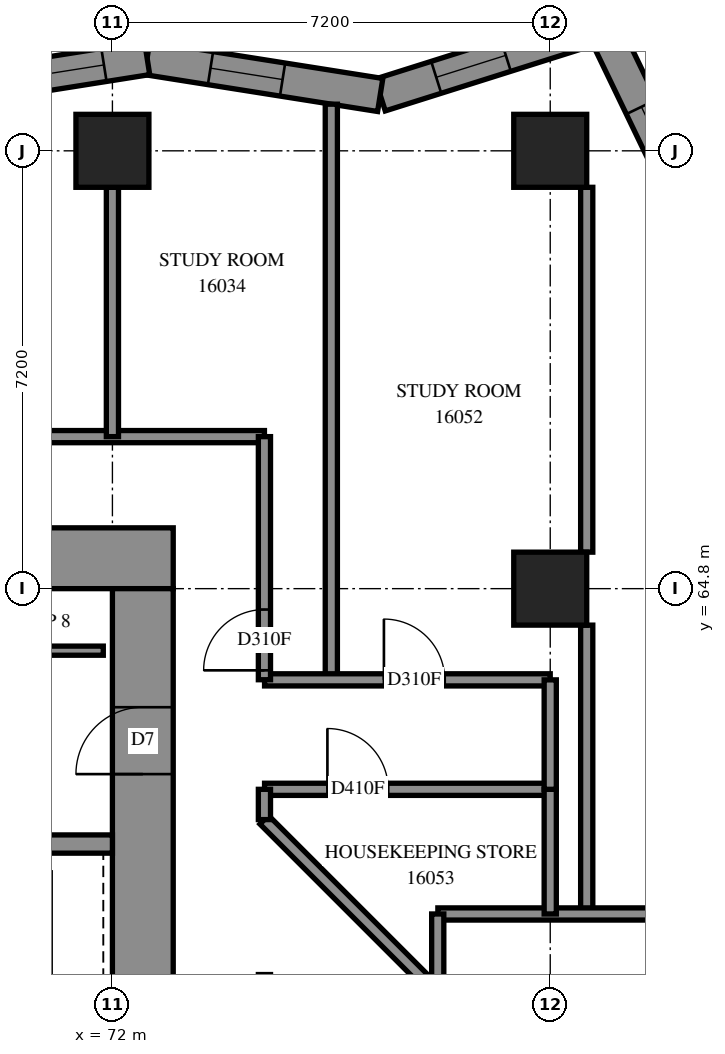
"""IFC4 building model, lengths in metres.
Left out: names, types, materials, properties, quantities, classifications, styles, units other than length and angle.
Written with IfcOpenShell. Run it as: python <this file> out.ifc"""

import sys

from ifc_helpers import new_model, si_unit, direction, frame, frame_2d, origin, origin_2d, place, context, subcontext, project, spatial, polyline, rectangle, outline, extrude, element, fill, save


model = new_model("IFC4")
c1 = context("Model", 3, precision=1e-05, world=origin(), true_north=direction((0.0, 1.0)))
c2 = subcontext(c1, "Body", "Model", "MODEL_VIEW")
j1 = project(units=[si_unit("LENGTHUNIT", "METRE"), si_unit("PLANEANGLEUNIT", "RADIAN")], contexts=[c1])
p1 = place(None, origin())
s1 = spatial("IfcSite", under=j1, at=p1, CompositionType="ELEMENT")
p2 = place(p1, origin())
s2 = spatial("IfcBuilding", under=s1, at=p2, CompositionType="ELEMENT")
p3 = place(p2, frame((0.0, 0.0, 61.0)))
s3 = spatial("IfcBuildingStorey", under=s2, at=p3, CompositionType="ELEMENT", Elevation=61.0)
for number, where, z_axis, x_axis in (
    (1, (72.0, 72.0, 0.0), (0.0, 0.0, 1.0), (1.0, 0.0, 0.0)),
    (2, (79.2, 64.8, 0.0), (0.0, 0.0, 1.0), (1.0, 0.0, 0.0)),
    (3, (79.2, 72.0, 0.0), (0.0, 0.0, 1.0), (1.0, 0.0, 0.0)),
):
    element("IfcColumn", number, at=place(p3, frame(where, z_axis=z_axis, x_axis=x_axis)), inside=s3, PredefinedType="COLUMN", context=c2, shape_type="SweptSolid", body=[
        extrude(rectangle(XDim=1.2, YDim=1.2, at=origin_2d()), origin(), (0.0, 0.0, 1.0), 3.1),
    ])
p4 = place(p3, frame((56.6, 65.3, -0.3), z_axis=(0.0, 0.0, 1.0), x_axis=(1.0, 0.0, 0.0)))
e4 = element("IfcWall", 4, at=p4, inside=s3, PredefinedType="SHEAR", context=c2, shape_type="SweptSolid", body=[
    extrude(rectangle(XDim=16.4, YDim=1.0, at=frame_2d((8.2, 0.0))), origin(), (0.0, 0.0, 1.0), 2.7),
])
p5 = place(p4, frame((11.0, 0.0, 0.3)))
e5 = element("IfcOpeningElement", 5, at=p5, cuts=e4, PredefinedType="OPENING", context=c2, shape_type="SweptSolid", body=[
    extrude(rectangle(XDim=0.8, YDim=2.1, at=frame_2d((0.4, 1.05))), frame((0.0, 0.51, 0.0), z_axis=(0.0, -1.0, 0.0), x_axis=(1.0, 0.0, 0.0)), (0.0, 0.0, 1.0), 1.02),
])
p6 = place(p3, frame((72.5, 50.4, -0.3), z_axis=(0.0, 0.0, 1.0), x_axis=(0.0, 1.0, 0.0)))
e6 = element("IfcWall", 6, at=p6, inside=s3, PredefinedType="SHEAR", context=c2, shape_type="SweptSolid", body=[
    extrude(rectangle(XDim=14.4, YDim=1.0, at=frame_2d((7.2, 0.0))), origin(), (0.0, 0.0, 1.0), 2.7),
])
p7 = place(p6, frame((4.55, 0.0, 0.3)))
e7 = element("IfcOpeningElement", 7, at=p7, cuts=e6, PredefinedType="OPENING", context=c2, shape_type="SweptSolid", body=[
    extrude(rectangle(XDim=1.1, YDim=2.1, at=frame_2d((0.55, 1.05))), frame((0.0, 0.51, 0.0), z_axis=(0.0, -1.0, 0.0), x_axis=(1.0, 0.0, 0.0)), (0.0, 0.0, 1.0), 1.02),
])
p8 = place(p6, frame((11.35, 0.0, 0.3)))
e8 = element("IfcOpeningElement", 8, at=p8, cuts=e6, PredefinedType="OPENING", context=c2, shape_type="SweptSolid", body=[
    extrude(rectangle(XDim=1.1, YDim=2.1, at=frame_2d((0.55, 1.05))), frame((0.0, 0.51, 0.0), z_axis=(0.0, -1.0, 0.0), x_axis=(1.0, 0.0, 0.0)), (0.0, 0.0, 1.0), 1.02),
])
p9 = place(p3, frame((64.8, 60.6, 0.0), z_axis=(0.0, 0.0, 1.0), x_axis=(1.0, 0.0, 0.0)))
e9 = element("IfcWall", 9, at=p9, inside=s3, PredefinedType="SOLIDWALL", context=c2, shape_type="SweptSolid", body=[
    extrude(rectangle(XDim=7.2, YDim=0.3, at=frame_2d((3.6, 0.0))), origin(), (0.0, 0.0, 1.0), 3.1),
])
p10 = place(p3, frame((76.301, 49.443, -0.3), z_axis=(0.0, 0.0, 1.0), x_axis=(0.7071067812, 0.7071067812, 0.0)))
e10 = element("IfcWall", 10, at=p10, inside=s3, PredefinedType="SHEAR", context=c2, shape_type="SweptSolid", body=[
    extrude(rectangle(XDim=14.4, YDim=1.0, at=frame_2d((7.2, 0.0))), origin(), (0.0, 0.0, 1.0), 2.7),
])
p11 = place(p10, frame((4.55, 0.0, 0.3)))
e11 = element("IfcOpeningElement", 11, at=p11, cuts=e10, PredefinedType="OPENING", context=c2, shape_type="SweptSolid", body=[
    extrude(rectangle(XDim=1.1, YDim=2.1, at=frame_2d((0.55, 1.05))), frame((0.0, 0.51, 0.0), z_axis=(0.0, -1.0, 0.0), x_axis=(1.0, 0.0, 0.0)), (0.0, 0.0, 1.0), 1.02),
])
p12 = place(p10, frame((11.35, 0.0, 0.3)))
e12 = element("IfcOpeningElement", 12, at=p12, cuts=e10, PredefinedType="OPENING", context=c2, shape_type="SweptSolid", body=[
    extrude(rectangle(XDim=1.1, YDim=2.1, at=frame_2d((0.55, 1.05))), frame((0.0, 0.51, 0.0), z_axis=(0.0, -1.0, 0.0), x_axis=(1.0, 0.0, 0.0)), (0.0, 0.0, 1.0), 1.02),
])
p13 = place(p3, frame((81.559, 70.938, 0.0), z_axis=(0.0, 0.0, 1.0), x_axis=(-0.4338121581, 0.901003336, 0.0)))
e13 = element("IfcWall", 13, at=p13, inside=s3, PredefinedType="SOLIDWALL", context=c2, shape_type="SweptSolid", body=[
    extrude(outline(polyline([(0.072, -0.275), (3.713, -0.275), (3.237, 0.275), (-0.072, 0.275), (0.072, -0.275)])), origin(), (0.0, 0.0, 1.0), 3.1),
])
p14 = place(p13, frame((0.781, 0.0, 0.5)))
e14 = element("IfcOpeningElement", 14, at=p14, cuts=e13, PredefinedType="OPENING", context=c2, shape_type="SweptSolid", body=[
    extrude(rectangle(XDim=1.2, YDim=2.45, at=frame_2d((0.6, 1.225))), frame((0.0, 0.285, 0.0), z_axis=(0.0, -1.0, 0.0), x_axis=(1.0, 0.0, 0.0)), (0.0, 0.0, 1.0), 0.57),
])
p15 = place(p3, frame((80.051, 74.069, 0.0), z_axis=(0.0, 0.0, 1.0), x_axis=(-0.953649035, -0.3009211159, 0.0)))
e15 = element("IfcWall", 15, at=p15, inside=s3, PredefinedType="SOLIDWALL", context=c2, shape_type="SweptSolid", body=[
    extrude(outline(polyline([(-0.238, -0.275), (3.76, -0.275), (3.889, 0.275), (0.238, 0.275), (-0.238, -0.275)])), origin(), (0.0, 0.0, 1.0), 3.1),
])
p16 = place(p15, frame((1.658, 0.0, 0.5)))
e16 = element("IfcOpeningElement", 16, at=p16, cuts=e15, PredefinedType="OPENING", context=c2, shape_type="SweptSolid", body=[
    extrude(rectangle(XDim=1.2, YDim=2.45, at=frame_2d((0.6, 1.225))), frame((0.0, 0.285, 0.0), z_axis=(0.0, -1.0, 0.0), x_axis=(1.0, 0.0, 0.0)), (0.0, 0.0, 1.0), 0.57),
])
p17 = place(p3, frame((76.404, 72.918, 0.0), z_axis=(0.0, 0.0, 1.0), x_axis=(-0.9877221932, 0.1562205785, 0.0)))
e17 = element("IfcWall", 17, at=p17, inside=s3, PredefinedType="SOLIDWALL", context=c2, shape_type="SweptSolid", body=[
    extrude(outline(polyline([(0.065, -0.275), (3.925, -0.275), (3.838, 0.275), (-0.065, 0.275), (0.065, -0.275)])), origin(), (0.0, 0.0, 1.0), 3.1),
])
p18 = place(p17, frame((1.626, 0.0, 0.5)))
e18 = element("IfcOpeningElement", 18, at=p18, cuts=e17, PredefinedType="OPENING", context=c2, shape_type="SweptSolid", body=[
    extrude(rectangle(XDim=1.2, YDim=2.45, at=frame_2d((0.6, 1.225))), frame((0.0, 0.285, 0.0), z_axis=(0.0, -1.0, 0.0), x_axis=(1.0, 0.0, 0.0)), (0.0, 0.0, 1.0), 0.57),
])
p19 = place(p3, frame((72.571, 73.525, 0.0), z_axis=(0.0, 0.0, 1.0), x_axis=(-0.9877213372, -0.1562259905, 0.0)))
e19 = element("IfcWall", 19, at=p19, inside=s3, PredefinedType="SOLIDWALL", context=c2, shape_type="SweptSolid", body=[
    extrude(outline(polyline([(-0.043, -0.275), (3.816, -0.275), (3.903, 0.275), (0.043, 0.275), (-0.043, -0.275)])), origin(), (0.0, 0.0, 1.0), 3.1),
])
p20 = place(p19, frame((0.719, 0.0, 0.5)))
e20 = element("IfcOpeningElement", 20, at=p20, cuts=e19, PredefinedType="OPENING", context=c2, shape_type="SweptSolid", body=[
    extrude(rectangle(XDim=2.8, YDim=2.45, at=frame_2d((1.4, 1.225))), frame((0.0, 0.285, 0.0), z_axis=(0.0, -1.0, 0.0), x_axis=(1.0, 0.0, 0.0)), (0.0, 0.0, 1.0), 0.57),
])
p21 = place(p3, frame((64.95, 63.78, 0.0), z_axis=(0.0, 0.0, 1.0), x_axis=(1.0, 0.0, 0.0)))
e21 = element("IfcWall", 21, at=p21, inside=s3, PredefinedType="PARTITIONING", context=c2, shape_type="SweptSolid", body=[
    extrude(rectangle(XDim=6.9, YDim=0.15, at=frame_2d((3.45, 0.0))), origin(), (0.0, 0.0, 1.0), 3.1),
])
p22 = place(p3, frame((55.1, 67.3, 0.0), z_axis=(0.0, 0.0, 1.0), x_axis=(1.0, 0.0, 0.0)))
e22 = element("IfcWall", 22, at=p22, inside=s3, PredefinedType="PARTITIONING", context=c2, shape_type="SweptSolid", body=[
    extrude(rectangle(XDim=19.4, YDim=0.2, at=frame_2d((9.7, 0.0))), origin(), (0.0, 0.0, 1.0), 3.1),
])
p23 = place(p22, frame((6.361, 0.0, 0.0)))
e23 = element("IfcOpeningElement", 23, at=p23, cuts=e22, PredefinedType="OPENING", context=c2, shape_type="SweptSolid", body=[
    extrude(rectangle(XDim=0.9, YDim=2.1, at=frame_2d((0.45, 1.05))), frame((0.0, 0.11, 0.0), z_axis=(0.0, -1.0, 0.0), x_axis=(1.0, 0.0, 0.0)), (0.0, 0.0, 1.0), 0.22),
])
p24 = place(p22, frame((13.561, 0.0, 0.0)))
e24 = element("IfcOpeningElement", 24, at=p24, cuts=e22, PredefinedType="OPENING", context=c2, shape_type="SweptSolid", body=[
    extrude(rectangle(XDim=0.9, YDim=2.1, at=frame_2d((0.45, 1.05))), frame((0.0, 0.11, 0.0), z_axis=(0.0, -1.0, 0.0), x_axis=(1.0, 0.0, 0.0)), (0.0, 0.0, 1.0), 0.22),
])
p25 = place(p3, frame((75.6, 63.3, 0.0), z_axis=(0.0, 0.0, 1.0), x_axis=(0.0, 1.0, 0.0)))
e25 = element("IfcWall", 25, at=p25, inside=s3, PredefinedType="PARTITIONING", context=c2, shape_type="SweptSolid", body=[
    extrude(rectangle(XDim=9.467, YDim=0.2, at=frame_2d((4.734, 0.0))), origin(), (0.0, 0.0, 1.0), 3.1),
])
p26 = place(p3, frame((79.8, 65.4, 0.0), z_axis=(0.0, 0.0, 1.0), x_axis=(0.0, 1.0, 0.0)))
e26 = element("IfcWall", 26, at=p26, inside=s3, PredefinedType="PARTITIONING", context=c2, shape_type="SweptSolid", body=[
    extrude(rectangle(XDim=6.0, YDim=0.2, at=frame_2d((3.0, 0.0))), origin(), (0.0, 0.0, 1.0), 3.1),
])
p27 = place(p3, frame((79.8, 59.45, 0.0), z_axis=(0.0, 0.0, 1.0), x_axis=(0.0, 1.0, 0.0)))
e27 = element("IfcWall", 27, at=p27, inside=s3, PredefinedType="PARTITIONING", context=c2, shape_type="SweptSolid", body=[
    extrude(rectangle(XDim=4.75, YDim=0.2, at=frame_2d((2.375, 0.0))), origin(), (0.0, 0.0, 1.0), 3.1),
])
p28 = place(p3, frame((74.502, 63.3, 0.0), z_axis=(0.0, 0.0, 1.0), x_axis=(1.0, 0.0, 0.0)))
e28 = element("IfcWall", 28, at=p28, inside=s3, PredefinedType="PARTITIONING", context=c2, shape_type="SweptSolid", body=[
    extrude(rectangle(XDim=4.698, YDim=0.2, at=frame_2d((2.349, 0.0))), origin(), (0.0, 0.0, 1.0), 3.1),
])
p29 = place(p28, frame((1.963, 0.0, 0.0)))
e29 = element("IfcOpeningElement", 29, at=p29, cuts=e28, PredefinedType="OPENING", context=c2, shape_type="SweptSolid", body=[
    extrude(rectangle(XDim=1.0, YDim=2.1, at=frame_2d((0.5, 1.05))), frame((0.0, 0.11, 0.0), z_axis=(0.0, -1.0, 0.0), x_axis=(1.0, 0.0, 0.0)), (0.0, 0.0, 1.0), 0.22),
])
p30 = place(p3, frame((74.502, 61.5, 0.0), z_axis=(0.0, 0.0, 1.0), x_axis=(1.0, 0.0, 0.0)))
e30 = element("IfcWall", 30, at=p30, inside=s3, PredefinedType="PARTITIONING", context=c2, shape_type="SweptSolid", body=[
    extrude(rectangle(XDim=4.698, YDim=0.2, at=frame_2d((2.349, 0.0))), origin(), (0.0, 0.0, 1.0), 3.1),
])
p31 = place(p30, frame((1.034, 0.0, 0.0)))
e31 = element("IfcOpeningElement", 31, at=p31, cuts=e30, PredefinedType="OPENING", context=c2, shape_type="SweptSolid", body=[
    extrude(rectangle(XDim=1.0, YDim=2.1, at=frame_2d((0.5, 1.05))), frame((0.0, 0.11, 0.0), z_axis=(0.0, -1.0, 0.0), x_axis=(1.0, 0.0, 0.0)), (0.0, 0.0, 1.0), 0.22),
])
p32 = place(p3, frame((72.0, 67.3, 0.0), z_axis=(0.0, 0.0, 1.0), x_axis=(0.0, 1.0, 0.0)))
e32 = element("IfcWall", 32, at=p32, inside=s3, PredefinedType="PARTITIONING", context=c2, shape_type="SweptSolid", body=[
    extrude(rectangle(XDim=4.1, YDim=0.2, at=frame_2d((2.05, 0.0))), origin(), (0.0, 0.0, 1.0), 3.1),
])
p33 = place(p3, frame((74.497, 60.999, 0.0), z_axis=(0.0, 0.0, 1.0), x_axis=(0.7071067812, -0.7071067812, 0.0)))
e33 = element("IfcWall", 33, at=p33, inside=s3, PredefinedType="PARTITIONING", context=c2, shape_type="SweptSolid", body=[
    extrude(rectangle(XDim=4.028, YDim=0.2, at=frame_2d((2.014, 0.0))), origin(), (0.0, 0.0, 1.0), 3.1),
])
p34 = place(p3, frame((74.5, 63.302, 0.0), z_axis=(0.0, 0.0, 1.0), x_axis=(0.0, 1.0, 0.0)))
e34 = element("IfcWall", 34, at=p34, inside=s3, PredefinedType="PARTITIONING", context=c2, shape_type="SweptSolid", body=[
    extrude(rectangle(XDim=3.998, YDim=0.2, at=frame_2d((1.999, 0.0))), origin(), (0.0, 0.0, 1.0), 3.1),
])
p35 = place(p34, frame((0.154, 0.0, 0.0)))
e35 = element("IfcOpeningElement", 35, at=p35, cuts=e34, PredefinedType="OPENING", context=c2, shape_type="SweptSolid", body=[
    extrude(rectangle(XDim=1.0, YDim=2.1, at=frame_2d((0.5, 1.05))), frame((0.0, 0.11, 0.0), z_axis=(0.0, -1.0, 0.0), x_axis=(1.0, 0.0, 0.0)), (0.0, 0.0, 1.0), 0.22),
])
p36 = place(p3, frame((77.352, 59.45, 0.0), z_axis=(0.0, 0.0, 1.0), x_axis=(1.0, 0.0, 0.0)))
e36 = element("IfcWall", 36, at=p36, inside=s3, PredefinedType="PARTITIONING", context=c2, shape_type="SweptSolid", body=[
    extrude(rectangle(XDim=3.698, YDim=0.2, at=frame_2d((1.849, 0.0))), origin(), (0.0, 0.0, 1.0), 3.1),
])
p37 = place(p3, frame((79.2, 59.45, 0.0), z_axis=(0.0, 0.0, 1.0), x_axis=(0.0, 1.0, 0.0)))
e37 = element("IfcWall", 37, at=p37, inside=s3, PredefinedType="PARTITIONING", context=c2, shape_type="SweptSolid", body=[
    extrude(rectangle(XDim=2.05, YDim=0.2, at=frame_2d((1.025, 0.0))), origin(), (0.0, 0.0, 1.0), 3.1),
])
p38 = place(p3, frame((79.2, 61.5, 0.0), z_axis=(0.0, 0.0, 1.0), x_axis=(0.0, 1.0, 0.0)))
e38 = element("IfcWall", 38, at=p38, inside=s3, PredefinedType="PARTITIONING", context=c2, shape_type="SweptSolid", body=[
    extrude(rectangle(XDim=1.8, YDim=0.2, at=frame_2d((0.9, 0.0))), origin(), (0.0, 0.0, 1.0), 3.1),
])
p39 = place(p3, frame((77.35, 58.154, 0.0), z_axis=(0.0, 0.0, 1.0), x_axis=(0.0, 1.0, 0.0)))
e39 = element("IfcWall", 39, at=p39, inside=s3, PredefinedType="PARTITIONING", context=c2, shape_type="SweptSolid", body=[
    extrude(rectangle(XDim=1.296, YDim=0.2, at=frame_2d((0.648, 0.0))), origin(), (0.0, 0.0, 1.0), 3.1),
])
p40 = place(p3, frame((74.5, 61.002, 0.0), z_axis=(0.0, 0.0, 1.0), x_axis=(0.0, 1.0, 0.0)))
e40 = element("IfcWall", 40, at=p40, inside=s3, PredefinedType="PARTITIONING", context=c2, shape_type="SweptSolid", body=[
    extrude(rectangle(XDim=0.498, YDim=0.2, at=frame_2d((0.249, 0.0))), origin(), (0.0, 0.0, 1.0), 3.1),
])
p41 = place(p14, origin())
e41 = element("IfcWindow", 41, at=p41, inside=s3, PartitioningType="SINGLE_PANEL", PredefinedType="WINDOW", context=c2, shape_type="SweptSolid", body=[
    extrude(rectangle(XDim=1.2, YDim=2.45, at=frame_2d((0.6, 1.225))), frame((0.0, 0.155, 0.0), z_axis=(0.0, -1.0, 0.0), x_axis=(1.0, 0.0, 0.0)), (0.0, 0.0, 1.0), 0.06),
])
fill(e14, e41)
p42 = place(p16, origin())
e42 = element("IfcWindow", 42, at=p42, inside=s3, PartitioningType="SINGLE_PANEL", PredefinedType="WINDOW", context=c2, shape_type="SweptSolid", body=[
    extrude(rectangle(XDim=1.2, YDim=2.45, at=frame_2d((0.6, 1.225))), frame((0.0, 0.155, 0.0), z_axis=(0.0, -1.0, 0.0), x_axis=(1.0, 0.0, 0.0)), (0.0, 0.0, 1.0), 0.06),
])
fill(e16, e42)
p43 = place(p18, origin())
e43 = element("IfcWindow", 43, at=p43, inside=s3, PartitioningType="SINGLE_PANEL", PredefinedType="WINDOW", context=c2, shape_type="SweptSolid", body=[
    extrude(rectangle(XDim=1.2, YDim=2.45, at=frame_2d((0.6, 1.225))), frame((0.0, 0.155, 0.0), z_axis=(0.0, -1.0, 0.0), x_axis=(1.0, 0.0, 0.0)), (0.0, 0.0, 1.0), 0.06),
])
fill(e18, e43)
p44 = place(p20, origin())
e44 = element("IfcWindow", 44, at=p44, inside=s3, PartitioningType="SINGLE_PANEL", PredefinedType="WINDOW", context=c2, shape_type="SweptSolid", body=[
    extrude(rectangle(XDim=2.8, YDim=2.45, at=frame_2d((1.4, 1.225))), frame((0.0, 0.155, 0.0), z_axis=(0.0, -1.0, 0.0), x_axis=(1.0, 0.0, 0.0)), (0.0, 0.0, 1.0), 0.06),
])
fill(e20, e44)
p45 = place(p8, origin())
e45 = element("IfcDoor", 45, at=p45, inside=s3, OperationType="SINGLE_SWING_RIGHT", PredefinedType="DOOR", context=c2, shape_type="SweptSolid", body=[
    extrude(rectangle(XDim=1.1, YDim=2.1, at=frame_2d((0.55, 1.05))), frame((0.0, 0.025, 0.0), z_axis=(0.0, -1.0, 0.0), x_axis=(1.0, 0.0, 0.0)), (0.0, 0.0, 1.0), 0.05),
])
fill(e8, e45)
p46 = place(p35, origin())
e46 = element("IfcDoor", 46, at=p46, inside=s3, OperationType="SINGLE_SWING_RIGHT", PredefinedType="DOOR", context=c2, shape_type="SweptSolid", body=[
    extrude(rectangle(XDim=1.0, YDim=2.1, at=frame_2d((0.5, 1.05))), frame((0.0, 0.025, 0.0), z_axis=(0.0, -1.0, 0.0), x_axis=(1.0, 0.0, 0.0)), (0.0, 0.0, 1.0), 0.05),
])
fill(e35, e46)
p47 = place(p29, origin())
e47 = element("IfcDoor", 47, at=p47, inside=s3, OperationType="SINGLE_SWING_LEFT", PredefinedType="DOOR", context=c2, shape_type="SweptSolid", body=[
    extrude(rectangle(XDim=1.0, YDim=2.1, at=frame_2d((0.5, 1.05))), frame((0.0, 0.025, 0.0), z_axis=(0.0, -1.0, 0.0), x_axis=(1.0, 0.0, 0.0)), (0.0, 0.0, 1.0), 0.05),
])
fill(e29, e47)
p48 = place(p31, origin())
e48 = element("IfcDoor", 48, at=p48, inside=s3, OperationType="SINGLE_SWING_RIGHT", PredefinedType="DOOR", context=c2, shape_type="SweptSolid", body=[
    extrude(rectangle(XDim=1.0, YDim=2.1, at=frame_2d((0.5, 1.05))), frame((0.0, 0.025, 0.0), z_axis=(0.0, -1.0, 0.0), x_axis=(1.0, 0.0, 0.0)), (0.0, 0.0, 1.0), 0.05),
])
fill(e31, e48)
save(model, sys.argv[1])
